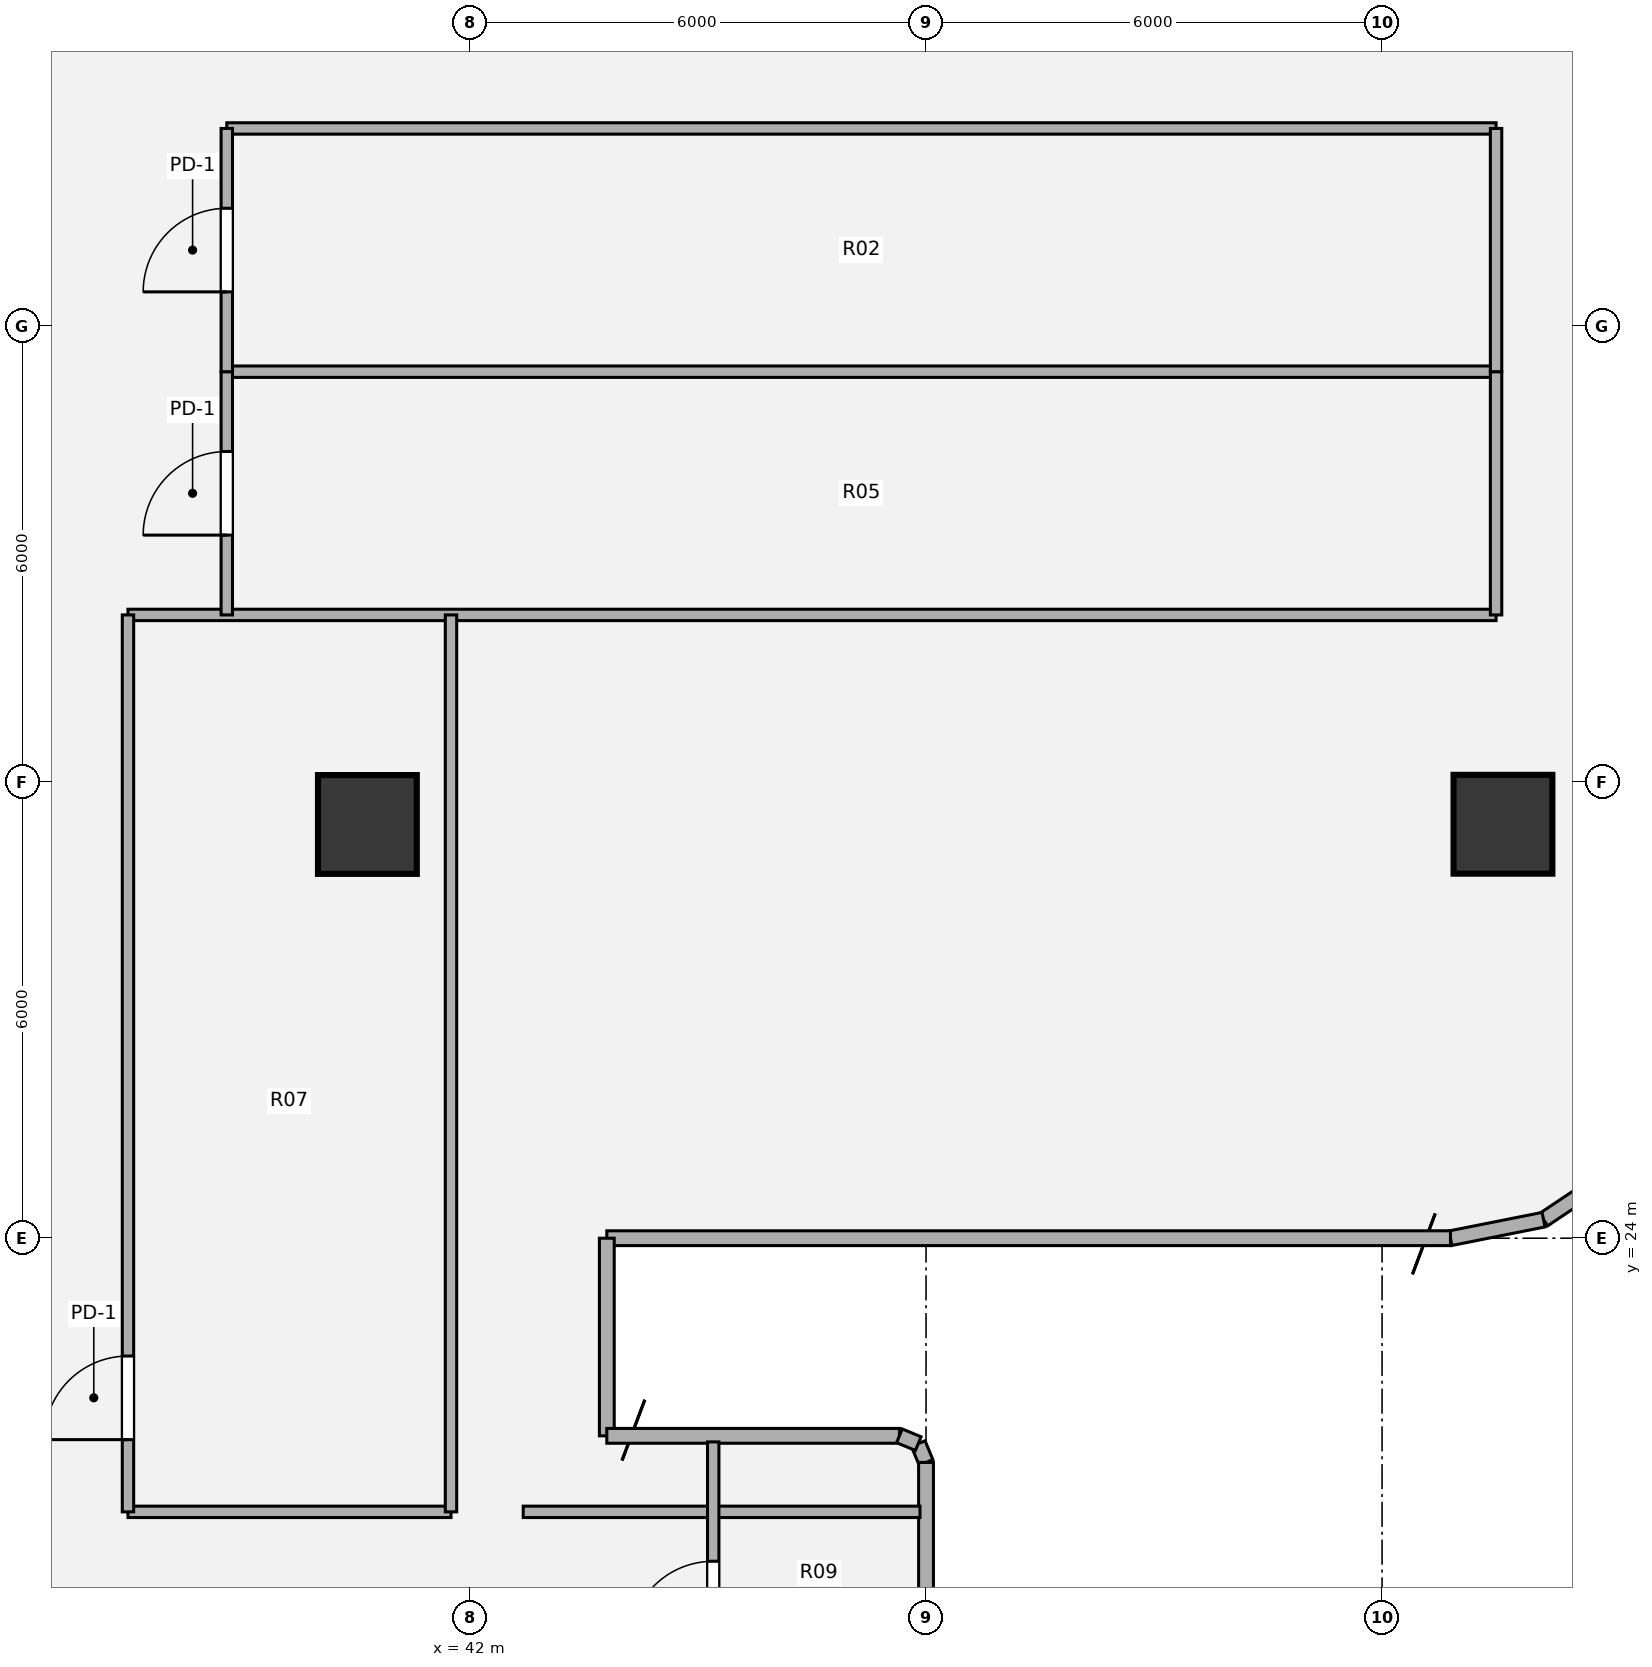
"""IFC4 building model, lengths in metres.
Left out: names, types, materials, properties, quantities, classifications, styles, units other than length and angle.
Written with IfcOpenShell. Run it as: python <this file> out.ifc"""

import sys

from ifc_helpers import new_model, si_unit, direction, frame, frame_2d, origin, origin_2d, place, context, subcontext, project, spatial, rectangle, hollow_circle, extrude, source, transform, mapped, element, fill, save


model = new_model("IFC4")
c1 = context("Model", 3, precision=1e-05, world=origin(), true_north=direction((0.0, 1.0)))
c2 = subcontext(c1, "Body", "Model", "MODEL_VIEW")
j1 = project(units=[si_unit("LENGTHUNIT", "METRE"), si_unit("PLANEANGLEUNIT", "RADIAN")], contexts=[c1])
p1 = place(None, origin())
s1 = spatial("IfcSite", under=j1, at=p1, CompositionType="ELEMENT")
p2 = place(p1, origin())
s2 = spatial("IfcBuilding", under=s1, at=p2, CompositionType="ELEMENT")
p3 = place(p2, frame((0.0, 0.0, 146.52)))
s3 = spatial("IfcBuildingStorey", under=s2, at=p3, CompositionType="ELEMENT", Elevation=146.52)
m1 = source(origin(), c2, "Body", "SweptSolid", [
    extrude(hollow_circle(Radius=0.65, WallThickness=0.045, at=origin_2d()), origin(), (0.0, 0.0, 1.0), 6.401),
])
p4 = place(p3, frame((56.068, 27.488, 0.428), z_axis=(-0.149100545965, 0.611964481829, 0.776703611536), x_axis=(-0.971578452533, -0.236717786771, 0.0)))
e1 = element("IfcColumn", 1, at=p4, inside=s3, PredefinedType="COLUMN", context=c2, shape_type="MappedRepresentation", body=[
    mapped(m1, transform((0.0, 0.0, 0.0), x_axis=(1.0, 0.0, 0.0), y_axis=(0.0, 1.0, 0.0), z_axis=(0.0, 0.0, 1.0), scale=1.0)),
])
m2 = source(origin(), c2, "Body", "SweptSolid", [
    extrude(hollow_circle(Radius=0.65, WallThickness=0.045, at=origin_2d()), origin(), (0.0, 0.0, 1.0), 6.244),
])
p5 = place(p3, frame((56.071, 39.148, 0.41), z_axis=(-0.153380159115, 0.581225961103, 0.799156373265), x_axis=(-0.96689991262, -0.255155950303, 0.0)))
e2 = element("IfcColumn", 2, at=p5, inside=s3, PredefinedType="COLUMN", context=c2, shape_type="MappedRepresentation", body=[
    mapped(m2, transform((0.0, 0.0, 0.0), x_axis=(1.0, 0.0, 0.0), y_axis=(0.0, 1.0, 0.0), z_axis=(0.0, 0.0, 1.0), scale=1.0)),
])
m3 = source(origin(), c2, "Body", "SweptSolid", [
    extrude(hollow_circle(Radius=0.65, WallThickness=0.045, at=origin_2d()), origin(), (0.0, 0.0, 1.0), 6.338),
])
p6 = place(p3, frame((40.65, 27.482, 0.421), z_axis=(0.0, 0.618885910055, 0.785480891133), x_axis=(-1.0, 0.0, 0.0)))
e3 = element("IfcColumn", 3, at=p6, inside=s3, PredefinedType="COLUMN", context=c2, shape_type="MappedRepresentation", body=[
    mapped(m3, transform((0.0, 0.0, 0.0), x_axis=(1.0, 0.0, 0.0), y_axis=(0.0, 1.0, 0.0), z_axis=(0.0, 0.0, 1.0), scale=1.0)),
])
p7 = place(p3, frame((47.897, 21.298, 0.0), z_axis=(0.0, 0.0, 1.0), x_axis=(0.382673670509, -0.923883575944, 0.0)))
e4 = element("IfcWall", 4, at=p7, inside=s3, PredefinedType="SOLIDWALL", context=c2, shape_type="SweptSolid", body=[
    extrude(rectangle(XDim=0.268, YDim=0.195, at=frame_2d((0.134, 0.0))), origin(), (0.0, 0.0, 1.0), 5.08),
])
p8 = place(p3, frame((48.0, 21.05, 0.0), z_axis=(0.0, 0.0, 1.0), x_axis=(0.0, -1.0, 0.0)))
e5 = element("IfcWall", 5, at=p8, inside=s3, PredefinedType="SOLIDWALL", context=c2, shape_type="SweptSolid", body=[
    extrude(rectangle(XDim=2.62, YDim=0.195, at=frame_2d((1.31, 0.0))), origin(), (0.0, 0.0, 1.0), 5.08),
])
for number, where, z_axis, x_axis in (
    (6, (57.163, 24.937, 0.0), (0.0, 0.0, 1.0), (-0.831, -0.556, 0.0)),
    (7, (56.125, 24.244, 0.0), (0.0, 0.0, 1.0), (-0.981, -0.195, 0.0)),
):
    element("IfcWall", number, at=place(p3, frame(where, z_axis=z_axis, x_axis=x_axis)), inside=s3, PredefinedType="SOLIDWALL", context=c2, shape_type="SweptSolid", body=[
        extrude(rectangle(XDim=1.249, YDim=0.195, at=frame_2d((0.624, 0.0))), origin(), (0.0, 0.0, 1.0), 5.08),
    ])
p9 = place(p3, frame((54.9, 24.0, 0.0), z_axis=(0.0, 0.0, 1.0), x_axis=(-1.0, 0.0, 0.0)))
e8 = element("IfcWall", 8, at=p9, inside=s3, PredefinedType="SOLIDWALL", context=c2, shape_type="SweptSolid", body=[
    extrude(rectangle(XDim=11.1, YDim=0.195, at=frame_2d((5.55, 0.0))), origin(), (0.0, 0.0, 1.0), 5.08),
])
p10 = place(p3, frame((43.8, 24.0, 0.0), z_axis=(0.0, 0.0, 1.0), x_axis=(0.0, -1.0, 0.0)))
e9 = element("IfcWall", 9, at=p10, inside=s3, PredefinedType="SOLIDWALL", context=c2, shape_type="SweptSolid", body=[
    extrude(rectangle(XDim=2.6, YDim=0.195, at=frame_2d((1.3, 0.0))), origin(), (0.0, 0.0, 1.0), 5.08),
])
p11 = place(p3, frame((43.8, 21.4, 0.0), z_axis=(0.0, 0.0, 1.0), x_axis=(1.0, 0.0, 0.0)))
e10 = element("IfcWall", 10, at=p11, inside=s3, PredefinedType="SOLIDWALL", context=c2, shape_type="SweptSolid", body=[
    extrude(rectangle(XDim=3.85, YDim=0.195, at=frame_2d((1.925, 0.0))), origin(), (0.0, 0.0, 1.0), 5.08),
])
p12 = place(p3, frame((47.65, 21.4, 0.0), z_axis=(0.0, 0.0, 1.0), x_axis=(0.924205486139, -0.381895560841, 0.0)))
e11 = element("IfcWall", 11, at=p12, inside=s3, PredefinedType="SOLIDWALL", context=c2, shape_type="SweptSolid", body=[
    extrude(rectangle(XDim=0.268, YDim=0.195, at=frame_2d((0.134, 0.0))), origin(), (0.0, 0.0, 1.0), 5.08),
])
p13 = place(p3, frame((37.5, 20.4, 0.0), z_axis=(0.0, 0.0, 1.0), x_axis=(1.0, 0.0, 0.0)))
e12 = element("IfcWall", 12, at=p13, inside=s3, PredefinedType="PARTITIONING", context=c2, shape_type="SweptSolid", body=[
    extrude(rectangle(XDim=4.25, YDim=0.15, at=frame_2d((2.125, 0.0))), origin(), (0.0, 0.0, 1.0), 5.05),
])
p14 = place(p3, frame((42.7, 20.4, 0.0), z_axis=(0.0, 0.0, 1.0), x_axis=(1.0, 0.0, 0.0)))
e13 = element("IfcWall", 13, at=p14, inside=s3, PredefinedType="PARTITIONING", context=c2, shape_type="SweptSolid", body=[
    extrude(rectangle(XDim=5.22, YDim=0.15, at=frame_2d((2.61, 0.0))), origin(), (0.0, 0.0, 1.0), 5.05),
])
p15 = place(p3, frame((37.5, 32.2, 0.0), z_axis=(0.0, 0.0, 1.0), x_axis=(1.0, 0.0, 0.0)))
e14 = element("IfcWall", 14, at=p15, inside=s3, PredefinedType="PARTITIONING", context=c2, shape_type="SweptSolid", body=[
    extrude(rectangle(XDim=18.0, YDim=0.15, at=frame_2d((9.0, 0.0))), origin(), (0.0, 0.0, 1.0), 5.05),
])
for number, where, z_axis, x_axis in (
    (15, (38.8, 35.4, 0.0), (0.0, 0.0, 1.0), (1.0, 0.0, 0.0)),
    (16, (38.8, 38.6, 0.0), (0.0, 0.0, 1.0), (1.0, 0.0, 0.0)),
):
    element("IfcWall", number, at=place(p3, frame(where, z_axis=z_axis, x_axis=x_axis)), inside=s3, PredefinedType="PARTITIONING", context=c2, shape_type="SweptSolid", body=[
        extrude(rectangle(XDim=16.7, YDim=0.15, at=frame_2d((8.35, 0.0))), origin(), (0.0, 0.0, 1.0), 4.532),
    ])
p16 = place(p3, frame((37.5, 20.4, 0.0), z_axis=(0.0, 0.0, 1.0), x_axis=(0.0, 1.0, 0.0)))
e17 = element("IfcWall", 17, at=p16, inside=s3, PredefinedType="PARTITIONING", context=c2, shape_type="SweptSolid", body=[
    extrude(rectangle(XDim=11.8, YDim=0.15, at=frame_2d((5.9, 0.0))), origin(), (0.0, 0.0, 1.0), 5.05),
])
p17 = place(p16, frame((0.95, 0.0, 0.0)))
e18 = element("IfcOpeningElement", 18, at=p17, cuts=e17, PredefinedType="OPENING", context=c2, shape_type="SweptSolid", body=[
    extrude(rectangle(XDim=1.1, YDim=2.1, at=origin_2d()), frame((0.55, 0.085, 1.05), z_axis=(0.0, -1.0, 0.0), x_axis=(1.0, 0.0, 0.0)), (0.0, 0.0, 1.0), 0.17),
])
p18 = place(p3, frame((38.8, 32.2, 0.0), z_axis=(0.0, 0.0, 1.0), x_axis=(0.0, 1.0, 0.0)))
e19 = element("IfcWall", 19, at=p18, inside=s3, PredefinedType="PARTITIONING", context=c2, shape_type="SweptSolid", body=[
    extrude(rectangle(XDim=3.2, YDim=0.15, at=frame_2d((1.6, 0.0))), origin(), (0.0, 0.0, 1.0), 5.05),
])
p19 = place(p18, frame((1.05, 0.0, 0.0)))
e20 = element("IfcOpeningElement", 20, at=p19, cuts=e19, PredefinedType="OPENING", context=c2, shape_type="SweptSolid", body=[
    extrude(rectangle(XDim=1.1, YDim=2.1, at=origin_2d()), frame((0.55, 0.085, 1.05), z_axis=(0.0, -1.0, 0.0), x_axis=(1.0, 0.0, 0.0)), (0.0, 0.0, 1.0), 0.17),
])
p20 = place(p3, frame((38.8, 35.4, 0.0), z_axis=(0.0, 0.0, 1.0), x_axis=(0.0, 1.0, 0.0)))
e21 = element("IfcWall", 21, at=p20, inside=s3, PredefinedType="PARTITIONING", context=c2, shape_type="SweptSolid", body=[
    extrude(rectangle(XDim=3.2, YDim=0.15, at=frame_2d((1.6, 0.0))), origin(), (0.0, 0.0, 1.0), 5.05),
])
p21 = place(p20, frame((1.05, 0.0, 0.0)))
e22 = element("IfcOpeningElement", 22, at=p21, cuts=e21, PredefinedType="OPENING", context=c2, shape_type="SweptSolid", body=[
    extrude(rectangle(XDim=1.1, YDim=2.1, at=origin_2d()), frame((0.55, 0.085, 1.05), z_axis=(0.0, -1.0, 0.0), x_axis=(1.0, 0.0, 0.0)), (0.0, 0.0, 1.0), 0.17),
])
p22 = place(p3, frame((41.75, 20.4, 0.0), z_axis=(0.0, 0.0, 1.0), x_axis=(0.0, 1.0, 0.0)))
e23 = element("IfcWall", 23, at=p22, inside=s3, PredefinedType="PARTITIONING", context=c2, shape_type="SweptSolid", body=[
    extrude(rectangle(XDim=11.8, YDim=0.15, at=frame_2d((5.9, 0.0))), origin(), (0.0, 0.0, 1.0), 3.265),
])
p23 = place(p3, frame((45.2, 18.0, 0.0), z_axis=(0.0, 0.0, 1.0), x_axis=(0.0, 1.0, 0.0)))
e24 = element("IfcWall", 24, at=p23, inside=s3, PredefinedType="PARTITIONING", context=c2, shape_type="SweptSolid", body=[
    extrude(rectangle(XDim=3.32, YDim=0.15, at=frame_2d((1.66, 0.0))), origin(), (0.0, 0.0, 1.0), 5.05),
])
p24 = place(p23, frame((0.65, 0.0, 0.0)))
e25 = element("IfcOpeningElement", 25, at=p24, cuts=e24, PredefinedType="OPENING", context=c2, shape_type="SweptSolid", body=[
    extrude(rectangle(XDim=1.1, YDim=2.1, at=origin_2d()), frame((0.55, 0.085, 1.05), z_axis=(0.0, -1.0, 0.0), x_axis=(1.0, 0.0, 0.0)), (0.0, 0.0, 1.0), 0.17),
])
p25 = place(p3, frame((55.5, 32.2, 0.0), z_axis=(0.0, 0.0, 1.0), x_axis=(0.0, 1.0, 0.0)))
e26 = element("IfcWall", 26, at=p25, inside=s3, PredefinedType="PARTITIONING", context=c2, shape_type="SweptSolid", body=[
    extrude(rectangle(XDim=3.2, YDim=0.15, at=frame_2d((1.6, 0.0))), origin(), (0.0, 0.0, 1.0), 5.05),
])
p26 = place(p3, frame((55.5, 35.4, 0.0), z_axis=(0.0, 0.0, 1.0), x_axis=(0.0, 1.0, 0.0)))
e27 = element("IfcWall", 27, at=p26, inside=s3, PredefinedType="PARTITIONING", context=c2, shape_type="SweptSolid", body=[
    extrude(rectangle(XDim=3.2, YDim=0.15, at=frame_2d((1.6, 0.0))), origin(), (0.0, 0.0, 1.0), 5.05),
])
m4 = source(origin(), c2, "Body", "SweptSolid", [
    extrude(rectangle(XDim=1.1, YDim=2.1, at=origin_2d()), frame((0.55, 0.025, 1.05), z_axis=(0.0, -1.0, 0.0), x_axis=(1.0, 0.0, 0.0)), (0.0, 0.0, 1.0), 0.05),
])
p27 = place(p17, origin())
e28 = element("IfcDoor", 28, at=p27, inside=s3, OperationType="SINGLE_SWING_LEFT", PredefinedType="DOOR", context=c2, shape_type="MappedRepresentation", body=[
    mapped(m4, transform((0.0, 0.0, 0.0), x_axis=(1.0, 0.0, 0.0), y_axis=(0.0, 1.0, 0.0), z_axis=(0.0, 0.0, 1.0), scale=1.0)),
])
fill(e18, e28)
p28 = place(p19, origin())
e29 = element("IfcDoor", 29, at=p28, inside=s3, OperationType="SINGLE_SWING_LEFT", PredefinedType="DOOR", context=c2, shape_type="MappedRepresentation", body=[
    mapped(m4, transform((0.0, 0.0, 0.0), x_axis=(1.0, 0.0, 0.0), y_axis=(0.0, 1.0, 0.0), z_axis=(0.0, 0.0, 1.0), scale=1.0)),
])
fill(e20, e29)
p29 = place(p21, origin())
e30 = element("IfcDoor", 30, at=p29, inside=s3, OperationType="SINGLE_SWING_LEFT", PredefinedType="DOOR", context=c2, shape_type="MappedRepresentation", body=[
    mapped(m4, transform((0.0, 0.0, 0.0), x_axis=(1.0, 0.0, 0.0), y_axis=(0.0, 1.0, 0.0), z_axis=(0.0, 0.0, 1.0), scale=1.0)),
])
fill(e22, e30)
p30 = place(p24, origin())
e31 = element("IfcDoor", 31, at=p30, inside=s3, OperationType="SINGLE_SWING_LEFT", PredefinedType="DOOR", context=c2, shape_type="MappedRepresentation", body=[
    mapped(m4, transform((0.0, 0.0, 0.0), x_axis=(1.0, 0.0, 0.0), y_axis=(0.0, 1.0, 0.0), z_axis=(0.0, 0.0, 1.0), scale=1.0)),
])
fill(e25, e31)
save(model, sys.argv[1])
